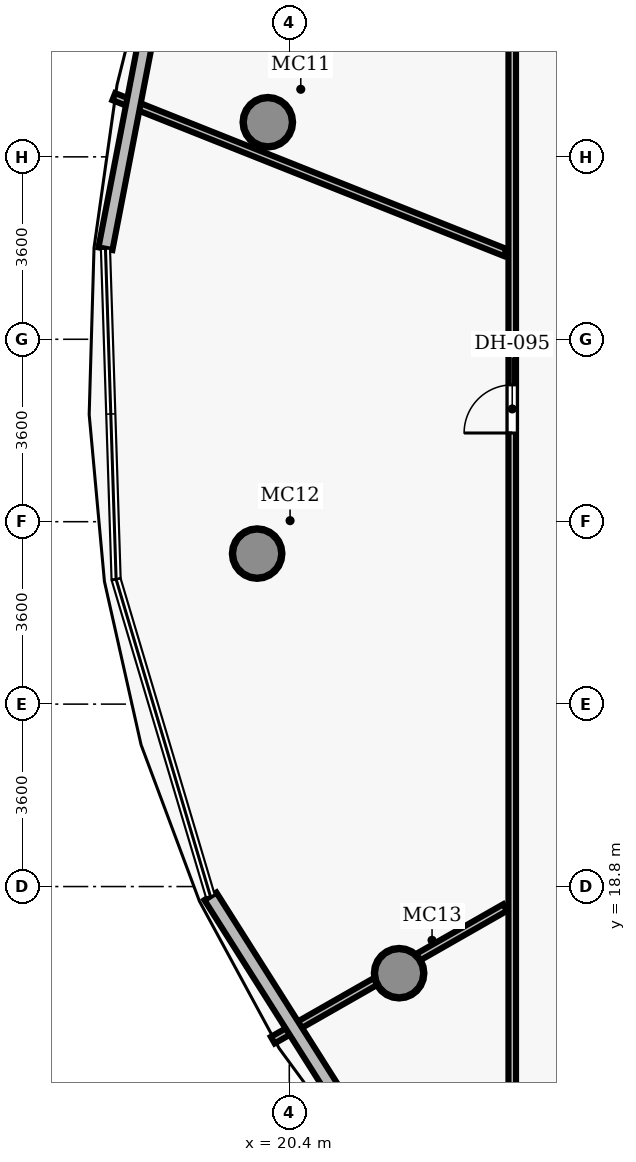
"""IFC4 building model, lengths in metres.
Left out: names, types, materials, properties, quantities, classifications, styles, units other than length and angle.
Written with IfcOpenShell. Run it as: python <this file> out.ifc"""

import sys

from ifc_helpers import new_model, si_unit, direction, frame, frame_2d, origin, origin_2d, place, context, subcontext, project, spatial, rectangle, hollow_circle, extrude, element, fill, save


model = new_model("IFC4")
c1 = context("Model", 3, precision=1e-05, world=origin(), true_north=direction((0.0, 1.0)))
c2 = subcontext(c1, "Body", "Model", "MODEL_VIEW")
j1 = project(units=[si_unit("LENGTHUNIT", "METRE"), si_unit("PLANEANGLEUNIT", "RADIAN")], contexts=[c1])
p1 = place(None, origin())
s1 = spatial("IfcSite", under=j1, at=p1, CompositionType="ELEMENT")
p2 = place(p1, origin())
s2 = spatial("IfcBuilding", under=s1, at=p2, CompositionType="ELEMENT")
p3 = place(p2, frame((0.0, 0.0, 295.95)))
s3 = spatial("IfcBuildingStorey", under=s2, at=p3, CompositionType="ELEMENT", Elevation=295.95)
for number, where, z_axis, x_axis in (
    (1, (19.976, 33.884, 0.0), (0.0, 0.0, 1.0), (1.0, 0.0, 0.0)),
    (2, (19.765, 25.371, 0.0), (0.0, 0.0, 1.0), (1.0, 0.0, 0.0)),
    (3, (22.567, 17.09, 0.0), (0.0, 0.0, 1.0), (1.0, 0.0, 0.0)),
):
    element("IfcColumn", number, at=place(p3, frame(where, z_axis=z_axis, x_axis=x_axis)), inside=s3, PredefinedType="COLUMN", context=c2, shape_type="SweptSolid", body=[
        extrude(hollow_circle(Radius=0.5, WallThickness=0.045, at=origin_2d()), origin(), (0.0, 0.0, 1.0), 3.85),
    ])
p4 = place(p3, frame((24.8, 11.208, 0.0), z_axis=(0.0, 0.0, 1.0), x_axis=(0.0, 1.0, 0.0)))
e4 = element("IfcWall", 4, at=p4, inside=s3, PredefinedType="PARTITIONING", context=c2, shape_type="SweptSolid", body=[
    extrude(rectangle(XDim=30.192, YDim=0.15, at=frame_2d((15.096, 0.0))), origin(), (0.0, 0.0, 1.0), 3.04),
])
p5 = place(p4, frame((16.542, 0.0, 0.0)))
e5 = element("IfcOpeningElement", 5, at=p5, cuts=e4, PredefinedType="OPENING", context=c2, shape_type="SweptSolid", body=[
    extrude(rectangle(XDim=0.95, YDim=2.15, at=frame_2d((0.475, 1.075))), frame((0.0, 0.085, 0.0), z_axis=(0.0, -1.0, 0.0), x_axis=(1.0, 0.0, 0.0)), (0.0, 0.0, 1.0), 0.17),
])
p6 = place(p3, frame((24.66, 31.312, 0.0), z_axis=(0.0, 0.0, 1.0), x_axis=(-0.929042706144, 0.369972499194, 0.0)))
e6 = element("IfcWall", 6, at=p6, inside=s3, PredefinedType="PARTITIONING", context=c2, shape_type="SweptSolid", body=[
    extrude(rectangle(XDim=8.313, YDim=0.15, at=frame_2d((4.157, 0.0))), origin(), (0.0, 0.0, 1.0), 3.04),
])
p7 = place(p3, frame((24.66, 18.387, 0.0), z_axis=(0.0, 0.0, 1.0), x_axis=(-0.868484898305, -0.495715625551, 0.0)))
e7 = element("IfcWall", 7, at=p7, inside=s3, PredefinedType="PARTITIONING", context=c2, shape_type="SweptSolid", body=[
    extrude(rectangle(XDim=5.28, YDim=0.15, at=frame_2d((2.64, 0.0))), origin(), (0.0, 0.0, 1.0), 3.04),
])
p8 = place(p3, frame((16.772, 31.387, 0.0), z_axis=(0.0, 0.0, 1.0), x_axis=(0.189578027275, 0.981865658619, 0.0)))
e8 = element("IfcWall", 8, at=p8, inside=s3, PredefinedType="SOLIDWALL", context=c2, shape_type="SweptSolid", body=[
    extrude(rectangle(XDim=6.345, YDim=0.28, at=frame_2d((3.172, 0.0))), origin(), (0.0, 0.0, 1.0), 3.625),
])
p9 = place(p3, frame((22.334, 13.093, 0.0), z_axis=(0.0, 0.0, 1.0), x_axis=(-0.53478508488, 0.844988114111, 0.0)))
e9 = element("IfcWall", 9, at=p9, inside=s3, PredefinedType="SOLIDWALL", context=c2, shape_type="SweptSolid", body=[
    extrude(rectangle(XDim=6.527, YDim=0.28, at=frame_2d((3.263, 0.0))), origin(), (0.0, 0.0, 1.0), 3.625),
])
p10 = place(p5, origin())
e10 = element("IfcDoor", 10, at=p10, inside=s3, OperationType="SINGLE_SWING_LEFT", PredefinedType="DOOR", context=c2, shape_type="SweptSolid", body=[
    extrude(rectangle(XDim=0.95, YDim=2.15, at=frame_2d((0.475, 1.075))), frame((0.0, 0.025, 0.0), z_axis=(0.0, -1.0, 0.0), x_axis=(1.0, 0.0, 0.0)), (0.0, 0.0, 1.0), 0.05),
])
fill(e5, e10)
save(model, sys.argv[1])
